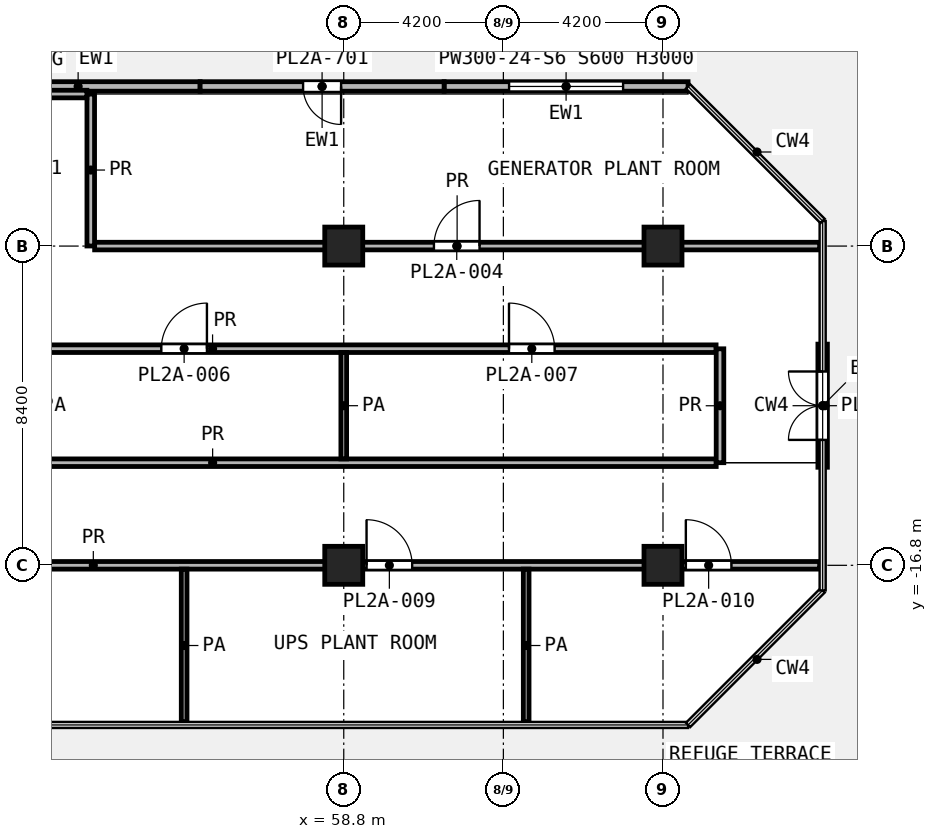
"""IFC4 building model, lengths in metres.
Left out: names, types, materials, properties, quantities, classifications, styles, units other than length and angle.
Written with IfcOpenShell. Run it as: python <this file> out.ifc"""

import sys

from ifc_helpers import new_model, si_unit, direction, frame, frame_2d, origin, origin_2d, place, context, subcontext, project, spatial, rectangle, extrude, element, fill, save


model = new_model("IFC4")
c1 = context("Model", 3, precision=1e-05, world=origin(), true_north=direction((0.0, 1.0)))
c2 = subcontext(c1, "Body", "Model", "MODEL_VIEW")
j1 = project(units=[si_unit("LENGTHUNIT", "METRE"), si_unit("PLANEANGLEUNIT", "RADIAN")], contexts=[c1])
p1 = place(None, origin())
s1 = spatial("IfcSite", under=j1, at=p1, CompositionType="ELEMENT")
p2 = place(p1, origin())
s2 = spatial("IfcBuilding", under=s1, at=p2, CompositionType="ELEMENT")
p3 = place(p2, frame((0.0, 0.0, 153.4)))
s3 = spatial("IfcBuildingStorey", under=s2, at=p3, CompositionType="ELEMENT", Elevation=153.4)
for number, where, z_axis, x_axis in (
    (1, (58.8, -8.4, 0.0), (0.0, 0.0, 1.0), (1.0, 0.0, 0.0)),
    (2, (67.2, -8.4, 0.0), (0.0, 0.0, 1.0), (1.0, 0.0, 0.0)),
    (3, (58.8, -16.8, 0.0), (0.0, 0.0, 1.0), (1.0, 0.0, 0.0)),
    (4, (67.2, -16.8, 0.0), (0.0, 0.0, 1.0), (1.0, 0.0, 0.0)),
):
    element("IfcColumn", number, at=place(p3, frame(where, z_axis=z_axis, x_axis=x_axis)), inside=s3, PredefinedType="COLUMN", context=c2, shape_type="SweptSolid", body=[
        extrude(rectangle(XDim=1.0, YDim=1.0, at=origin_2d()), origin(), (0.0, 0.0, 1.0), 5.0),
    ])
p4 = place(p3, frame((71.401, -14.22, 0.0), z_axis=(0.0, 0.0, 1.0), x_axis=(0.0, 1.0, 0.0)))
e5 = element("IfcWall", 5, at=p4, inside=s3, PredefinedType="SOLIDWALL", context=c2, shape_type="SweptSolid", body=[
    extrude(rectangle(XDim=3.24, YDim=0.25, at=frame_2d((1.62, 0.0))), origin(), (0.0, 0.0, 1.0), 4.24),
])
p5 = place(p4, frame((0.72, 0.0, 0.0)))
e6 = element("IfcOpeningElement", 6, at=p5, cuts=e5, PredefinedType="OPENING", context=c2, shape_type="SweptSolid", body=[
    extrude(rectangle(XDim=1.8, YDim=2.1, at=frame_2d((0.9, 1.05))), frame((0.0, 0.135, 0.0), z_axis=(0.0, -1.0, 0.0), x_axis=(1.0, 0.0, 0.0)), (0.0, 0.0, 1.0), 0.27),
])
p6 = place(p3, frame((67.86, -4.2, 0.0), z_axis=(0.0, 0.0, 1.0), x_axis=(-1.0, 0.0, 0.0)))
e7 = element("IfcWall", 7, at=p6, inside=s3, PredefinedType="SOLIDWALL", context=c2, shape_type="SweptSolid", body=[
    extrude(rectangle(XDim=6.42, YDim=0.25, at=frame_2d((3.21, 0.0))), origin(), (0.0, 0.0, 1.0), 4.4),
])
p7 = place(p6, frame((1.71, 0.0, 0.6)))
e8 = element("IfcOpeningElement", 8, at=p7, cuts=e7, PredefinedType="OPENING", context=c2, shape_type="SweptSolid", body=[
    extrude(rectangle(XDim=3.0, YDim=2.4, at=frame_2d((1.5, 1.2))), frame((0.0, 0.135, 0.0), z_axis=(0.0, -1.0, 0.0), x_axis=(1.0, 0.0, 0.0)), (0.0, 0.0, 1.0), 0.27),
])
p8 = place(p3, frame((61.44, -4.2, 0.0), z_axis=(0.0, 0.0, 1.0), x_axis=(-1.0, 0.0, 0.0)))
e9 = element("IfcWall", 9, at=p8, inside=s3, PredefinedType="SOLIDWALL", context=c2, shape_type="SweptSolid", body=[
    extrude(rectangle(XDim=6.42, YDim=0.25, at=frame_2d((3.21, 0.0))), origin(), (0.0, 0.0, 1.0), 4.4),
])
p9 = place(p8, frame((2.71, 0.0, 0.0)))
e10 = element("IfcOpeningElement", 10, at=p9, cuts=e9, PredefinedType="OPENING", context=c2, shape_type="SweptSolid", body=[
    extrude(rectangle(XDim=1.0, YDim=2.1, at=frame_2d((0.5, 1.05))), frame((0.0, 0.135, 0.0), z_axis=(0.0, -1.0, 0.0), x_axis=(1.0, 0.0, 0.0)), (0.0, 0.0, 1.0), 0.27),
])
p10 = place(p3, frame((55.021, -4.2, 0.0), z_axis=(0.0, 0.0, 1.0), x_axis=(-1.0, 0.0, 0.0)))
e11 = element("IfcWall", 11, at=p10, inside=s3, PredefinedType="SOLIDWALL", context=c2, shape_type="SweptSolid", body=[
    extrude(rectangle(XDim=6.42, YDim=0.25, at=frame_2d((3.21, 0.0))), origin(), (0.0, 0.0, 1.0), 4.4),
])
p11 = place(p3, frame((54.6, -20.92, 0.0), z_axis=(0.0, 0.0, 1.0), x_axis=(0.0, 1.0, 0.0)))
e12 = element("IfcWall", 12, at=p11, inside=s3, PredefinedType="PARTITIONING", context=c2, shape_type="SweptSolid", body=[
    extrude(rectangle(XDim=4.02, YDim=0.15, at=frame_2d((2.01, 0.0))), origin(), (0.0, 0.0, 1.0), 4.4),
])
p12 = place(p3, frame((58.8, -14.0, 0.0), z_axis=(0.0, 0.0, 1.0), x_axis=(0.0, 1.0, 0.0)))
e13 = element("IfcWall", 13, at=p12, inside=s3, PredefinedType="PARTITIONING", context=c2, shape_type="SweptSolid", body=[
    extrude(rectangle(XDim=2.8, YDim=0.15, at=frame_2d((1.4, 0.0))), origin(), (0.0, 0.0, 1.0), 4.4),
])
p13 = place(p3, frame((63.6, -20.92, 0.0), z_axis=(0.0, 0.0, 1.0), x_axis=(0.0, 1.0, 0.0)))
e14 = element("IfcWall", 14, at=p13, inside=s3, PredefinedType="PARTITIONING", context=c2, shape_type="SweptSolid", body=[
    extrude(rectangle(XDim=4.02, YDim=0.15, at=frame_2d((2.01, 0.0))), origin(), (0.0, 0.0, 1.0), 4.4),
])
p14 = place(p3, frame((33.1, -16.8, 0.0), z_axis=(0.0, 0.0, 1.0), x_axis=(1.0, 0.0, 0.0)))
e15 = element("IfcWall", 15, at=p14, inside=s3, PredefinedType="PARTITIONING", context=c2, shape_type="SweptSolid", body=[
    extrude(rectangle(XDim=38.221, YDim=0.2, at=frame_2d((19.11, 0.0))), origin(), (0.0, 0.0, 1.0), 4.4),
])
p15 = place(p14, frame((3.8, 0.0, 0.0)))
e16 = element("IfcOpeningElement", 16, at=p15, cuts=e15, PredefinedType="OPENING", context=c2, shape_type="SweptSolid", body=[
    extrude(rectangle(XDim=1.2, YDim=2.1, at=frame_2d((0.6, 1.05))), frame((0.0, 0.11, 0.0), z_axis=(0.0, -1.0, 0.0), x_axis=(1.0, 0.0, 0.0)), (0.0, 0.0, 1.0), 0.22),
])
p16 = place(p14, frame((15.5, 0.0, 0.0)))
e17 = element("IfcOpeningElement", 17, at=p16, cuts=e15, PredefinedType="OPENING", context=c2, shape_type="SweptSolid", body=[
    extrude(rectangle(XDim=1.2, YDim=2.1, at=frame_2d((0.6, 1.05))), frame((0.0, 0.11, 0.0), z_axis=(0.0, -1.0, 0.0), x_axis=(1.0, 0.0, 0.0)), (0.0, 0.0, 1.0), 0.22),
])
p17 = place(p14, frame((26.3, 0.0, 0.0)))
e18 = element("IfcOpeningElement", 18, at=p17, cuts=e15, PredefinedType="OPENING", context=c2, shape_type="SweptSolid", body=[
    extrude(rectangle(XDim=1.2, YDim=2.1, at=frame_2d((0.6, 1.05))), frame((0.0, 0.11, 0.0), z_axis=(0.0, -1.0, 0.0), x_axis=(1.0, 0.0, 0.0)), (0.0, 0.0, 1.0), 0.22),
])
p18 = place(p14, frame((34.701, 0.0, 0.0)))
e19 = element("IfcOpeningElement", 19, at=p18, cuts=e15, PredefinedType="OPENING", context=c2, shape_type="SweptSolid", body=[
    extrude(rectangle(XDim=1.2, YDim=2.1, at=frame_2d((0.6, 1.05))), frame((0.0, 0.11, 0.0), z_axis=(0.0, -1.0, 0.0), x_axis=(1.0, 0.0, 0.0)), (0.0, 0.0, 1.0), 0.22),
])
p19 = place(p3, frame((42.1, -14.1, 0.0), z_axis=(0.0, 0.0, 1.0), x_axis=(1.0, 0.0, 0.0)))
e20 = element("IfcWall", 20, at=p19, inside=s3, PredefinedType="PARTITIONING", context=c2, shape_type="SweptSolid", body=[
    extrude(rectangle(XDim=26.5, YDim=0.2, at=frame_2d((13.25, 0.0))), origin(), (0.0, 0.0, 1.0), 4.4),
])
p20 = place(p3, frame((42.1, -11.1, 0.0), z_axis=(0.0, 0.0, 1.0), x_axis=(1.0, 0.0, 0.0)))
e21 = element("IfcWall", 21, at=p20, inside=s3, PredefinedType="PARTITIONING", context=c2, shape_type="SweptSolid", body=[
    extrude(rectangle(XDim=26.497, YDim=0.2, at=frame_2d((13.249, 0.0))), origin(), (0.0, 0.0, 1.0), 4.4),
])
p21 = place(p20, frame((3.5, 0.0, 0.0)))
e22 = element("IfcOpeningElement", 22, at=p21, cuts=e21, PredefinedType="OPENING", context=c2, shape_type="SweptSolid", body=[
    extrude(rectangle(XDim=1.2, YDim=2.1, at=frame_2d((0.6, 1.05))), frame((0.0, 0.11, 0.0), z_axis=(0.0, -1.0, 0.0), x_axis=(1.0, 0.0, 0.0)), (0.0, 0.0, 1.0), 0.22),
])
p22 = place(p20, frame((11.9, 0.0, 0.0)))
e23 = element("IfcOpeningElement", 23, at=p22, cuts=e21, PredefinedType="OPENING", context=c2, shape_type="SweptSolid", body=[
    extrude(rectangle(XDim=1.2, YDim=2.1, at=frame_2d((0.6, 1.05))), frame((0.0, 0.11, 0.0), z_axis=(0.0, -1.0, 0.0), x_axis=(1.0, 0.0, 0.0)), (0.0, 0.0, 1.0), 0.22),
])
p23 = place(p20, frame((21.048, 0.0, 0.0)))
e24 = element("IfcOpeningElement", 24, at=p23, cuts=e21, PredefinedType="OPENING", context=c2, shape_type="SweptSolid", body=[
    extrude(rectangle(XDim=1.2, YDim=2.1, at=frame_2d((0.6, 1.05))), frame((0.0, 0.11, 0.0), z_axis=(0.0, -1.0, 0.0), x_axis=(1.0, 0.0, 0.0)), (0.0, 0.0, 1.0), 0.22),
])
p24 = place(p3, frame((52.245, -8.4, 0.0), z_axis=(0.0, 0.0, 1.0), x_axis=(1.0, 0.0, 0.0)))
e25 = element("IfcWall", 25, at=p24, inside=s3, PredefinedType="PARTITIONING", context=c2, shape_type="SweptSolid", body=[
    extrude(rectangle(XDim=19.076, YDim=0.2, at=frame_2d((9.538, 0.0))), origin(), (0.0, 0.0, 1.0), 4.4),
])
p25 = place(p24, frame((8.928, 0.0, 0.0)))
e26 = element("IfcOpeningElement", 26, at=p25, cuts=e25, PredefinedType="OPENING", context=c2, shape_type="SweptSolid", body=[
    extrude(rectangle(XDim=1.2, YDim=2.1, at=frame_2d((0.6, 1.05))), frame((0.0, 0.11, 0.0), z_axis=(0.0, -1.0, 0.0), x_axis=(1.0, 0.0, 0.0)), (0.0, 0.0, 1.0), 0.22),
])
p26 = place(p3, frame((48.68, -4.4, 0.0), z_axis=(0.0, 0.0, 1.0), x_axis=(1.0, 0.0, 0.0)))
e27 = element("IfcWall", 27, at=p26, inside=s3, PredefinedType="PARTITIONING", context=c2, shape_type="SweptSolid", body=[
    extrude(rectangle(XDim=3.361, YDim=0.2, at=frame_2d((1.681, 0.0))), origin(), (0.0, 0.0, 1.0), 4.4),
])
p27 = place(p3, frame((52.143, -8.398, 0.0), z_axis=(0.0, 0.0, 1.0), x_axis=(0.0, 1.0, 0.0)))
e28 = element("IfcWall", 28, at=p27, inside=s3, PredefinedType="PARTITIONING", context=c2, shape_type="SweptSolid", body=[
    extrude(rectangle(XDim=3.997, YDim=0.2, at=frame_2d((1.999, 0.0))), origin(), (0.0, 0.0, 1.0), 4.4),
])
p28 = place(p3, frame((68.7, -14.1, 0.0), z_axis=(0.0, 0.0, 1.0), x_axis=(0.0, 1.0, 0.0)))
e29 = element("IfcWall", 29, at=p28, inside=s3, PredefinedType="PARTITIONING", context=c2, shape_type="SweptSolid", body=[
    extrude(rectangle(XDim=2.997, YDim=0.2, at=frame_2d((1.499, 0.0))), origin(), (0.0, 0.0, 1.0), 4.4),
])
p29 = place(p5, origin())
e30 = element("IfcDoor", 30, at=p29, inside=s3, OperationType="DOUBLE_DOOR_SINGLE_SWING", PredefinedType="DOOR", context=c2, shape_type="SweptSolid", body=[
    extrude(rectangle(XDim=1.8, YDim=2.1, at=frame_2d((0.9, 1.05))), frame((0.0, 0.025, 0.0), z_axis=(0.0, -1.0, 0.0), x_axis=(1.0, 0.0, 0.0)), (0.0, 0.0, 1.0), 0.05),
])
fill(e6, e30)
p30 = place(p7, origin())
e31 = element("IfcWindow", 31, at=p30, inside=s3, PartitioningType="SINGLE_PANEL", PredefinedType="WINDOW", context=c2, shape_type="SweptSolid", body=[
    extrude(rectangle(XDim=3.0, YDim=2.4, at=frame_2d((1.5, 1.2))), frame((0.0, 0.03, 0.0), z_axis=(0.0, -1.0, 0.0), x_axis=(1.0, 0.0, 0.0)), (0.0, 0.0, 1.0), 0.06),
])
fill(e8, e31)
p31 = place(p9, origin())
e32 = element("IfcDoor", 32, at=p31, inside=s3, OperationType="SINGLE_SWING_LEFT", PredefinedType="DOOR", context=c2, shape_type="SweptSolid", body=[
    extrude(rectangle(XDim=1.0, YDim=2.1, at=frame_2d((0.5, 1.05))), frame((0.0, 0.025, 0.0), z_axis=(0.0, -1.0, 0.0), x_axis=(1.0, 0.0, 0.0)), (0.0, 0.0, 1.0), 0.05),
])
fill(e10, e32)
p32 = place(p25, origin())
e33 = element("IfcDoor", 33, at=p32, inside=s3, OperationType="SINGLE_SWING_RIGHT", PredefinedType="DOOR", context=c2, shape_type="SweptSolid", body=[
    extrude(rectangle(XDim=1.2, YDim=2.1, at=frame_2d((0.6, 1.05))), frame((0.0, 0.025, 0.0), z_axis=(0.0, -1.0, 0.0), x_axis=(1.0, 0.0, 0.0)), (0.0, 0.0, 1.0), 0.05),
])
fill(e26, e33)
p33 = place(p22, origin())
e34 = element("IfcDoor", 34, at=p33, inside=s3, OperationType="SINGLE_SWING_RIGHT", PredefinedType="DOOR", context=c2, shape_type="SweptSolid", body=[
    extrude(rectangle(XDim=1.2, YDim=2.1, at=frame_2d((0.6, 1.05))), frame((0.0, 0.025, 0.0), z_axis=(0.0, -1.0, 0.0), x_axis=(1.0, 0.0, 0.0)), (0.0, 0.0, 1.0), 0.05),
])
fill(e23, e34)
p34 = place(p23, origin())
e35 = element("IfcDoor", 35, at=p34, inside=s3, OperationType="SINGLE_SWING_LEFT", PredefinedType="DOOR", context=c2, shape_type="SweptSolid", body=[
    extrude(rectangle(XDim=1.2, YDim=2.1, at=frame_2d((0.6, 1.05))), frame((0.0, 0.025, 0.0), z_axis=(0.0, -1.0, 0.0), x_axis=(1.0, 0.0, 0.0)), (0.0, 0.0, 1.0), 0.05),
])
fill(e24, e35)
p35 = place(p17, origin())
e36 = element("IfcDoor", 36, at=p35, inside=s3, OperationType="SINGLE_SWING_LEFT", PredefinedType="DOOR", context=c2, shape_type="SweptSolid", body=[
    extrude(rectangle(XDim=1.2, YDim=2.1, at=frame_2d((0.6, 1.05))), frame((0.0, 0.025, 0.0), z_axis=(0.0, -1.0, 0.0), x_axis=(1.0, 0.0, 0.0)), (0.0, 0.0, 1.0), 0.05),
])
fill(e18, e36)
p36 = place(p18, origin())
e37 = element("IfcDoor", 37, at=p36, inside=s3, OperationType="SINGLE_SWING_LEFT", PredefinedType="DOOR", context=c2, shape_type="SweptSolid", body=[
    extrude(rectangle(XDim=1.2, YDim=2.1, at=frame_2d((0.6, 1.05))), frame((0.0, 0.025, 0.0), z_axis=(0.0, -1.0, 0.0), x_axis=(1.0, 0.0, 0.0)), (0.0, 0.0, 1.0), 0.05),
])
fill(e19, e37)
save(model, sys.argv[1])
